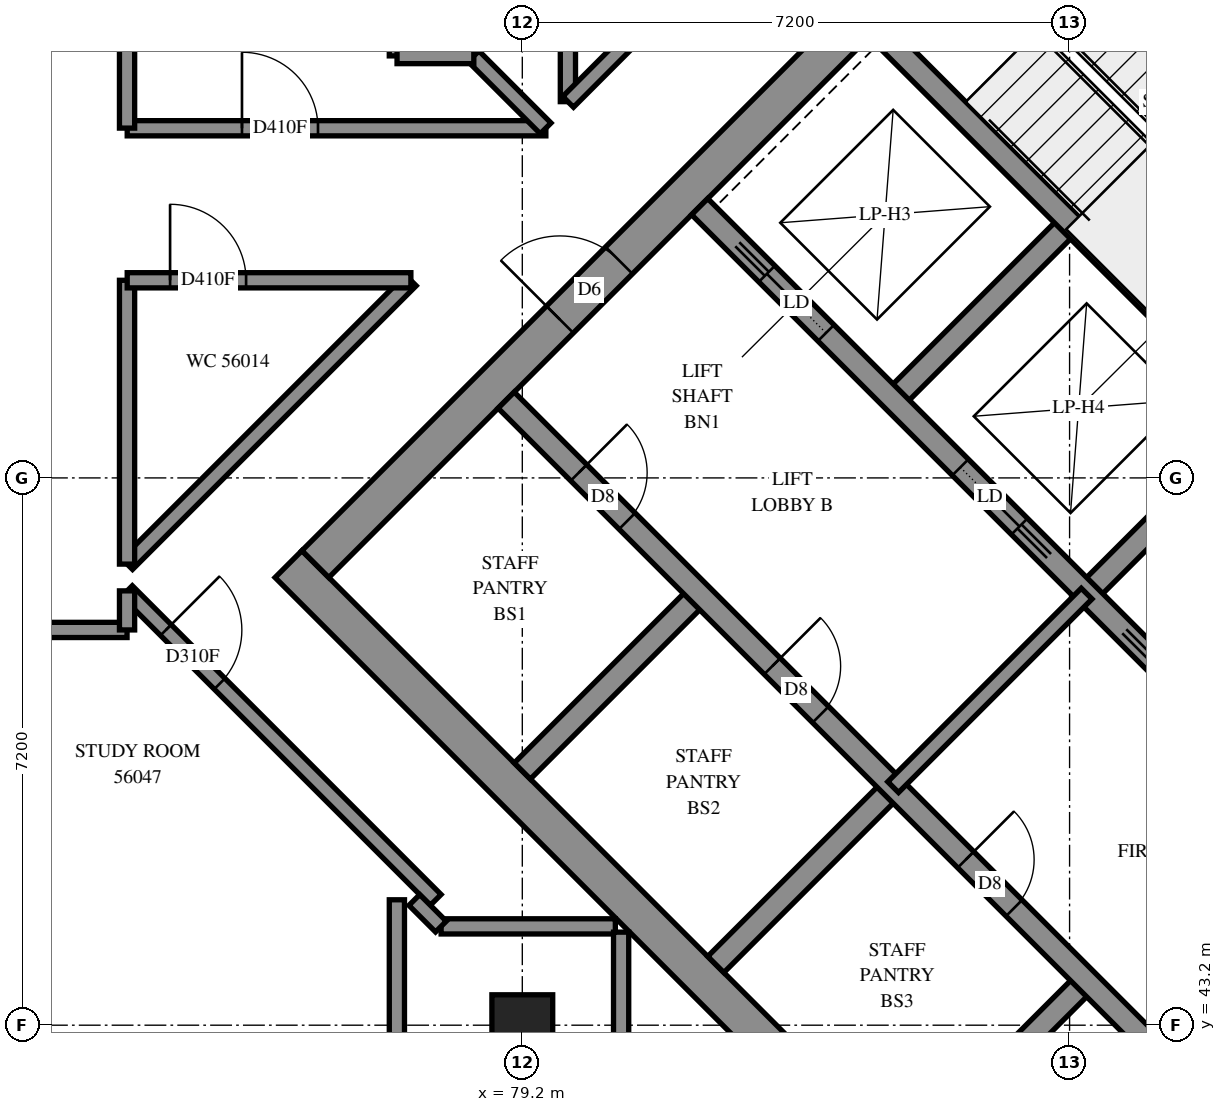
"""IFC4 building model, lengths in metres.
Left out: names, types, materials, properties, quantities, classifications, styles, units other than length and angle.
Written with IfcOpenShell. Run it as: python <this file> out.ifc"""

import sys

from ifc_helpers import new_model, si_unit, direction, frame, frame_2d, origin, origin_2d, place, context, subcontext, project, spatial, rectangle, extrude, element, fill, save


model = new_model("IFC4")
c1 = context("Model", 3, precision=1e-05, world=origin(), true_north=direction((0.0, 1.0)))
c2 = subcontext(c1, "Body", "Model", "MODEL_VIEW")
j1 = project(units=[si_unit("LENGTHUNIT", "METRE"), si_unit("PLANEANGLEUNIT", "RADIAN")], contexts=[c1])
p1 = place(None, origin())
s1 = spatial("IfcSite", under=j1, at=p1, CompositionType="ELEMENT")
p2 = place(p1, origin())
s2 = spatial("IfcBuilding", under=s1, at=p2, CompositionType="ELEMENT")
p3 = place(p2, frame((0.0, 0.0, 206.6)))
s3 = spatial("IfcBuildingStorey", under=s2, at=p3, CompositionType="ELEMENT", Elevation=206.6)
p4 = place(p3, frame((79.2, 43.2, 0.0), z_axis=(0.0, 0.0, 1.0), x_axis=(1.0, 0.0, 0.0)))
e1 = element("IfcColumn", 1, at=p4, inside=s3, PredefinedType="COLUMN", context=c2, shape_type="SweptSolid", body=[
    extrude(rectangle(XDim=0.8, YDim=0.8, at=origin_2d()), origin(), (0.0, 0.0, 1.0), 3.1),
])
p5 = place(p3, frame((76.124, 49.267, -0.3), z_axis=(0.0, 0.0, 1.0), x_axis=(0.7071067812, -0.7071067812, 0.0)))
e2 = element("IfcWall", 2, at=p5, inside=s3, PredefinedType="SHEAR", context=c2, shape_type="SweptSolid", body=[
    extrude(rectangle(XDim=15.4, YDim=0.5, at=frame_2d((7.7, 0.0))), origin(), (0.0, 0.0, 1.0), 2.7),
])
p6 = place(p3, frame((86.66, 59.802, -0.3), z_axis=(0.0, 0.0, 1.0), x_axis=(0.7071067812, -0.7071067812, 0.0)))
e3 = element("IfcWall", 3, at=p6, inside=s3, PredefinedType="SHEAR", context=c2, shape_type="SweptSolid", body=[
    extrude(rectangle(XDim=15.4, YDim=0.5, at=frame_2d((7.7, 0.0))), origin(), (0.0, 0.0, 1.0), 2.7),
])
p7 = place(p6, frame((10.5, 0.0, 0.3)))
e4 = element("IfcOpeningElement", 4, at=p7, cuts=e3, PredefinedType="OPENING", context=c2, shape_type="SweptSolid", body=[
    extrude(rectangle(XDim=0.8, YDim=2.1, at=frame_2d((0.4, 1.05))), frame((0.0, 0.26, 0.0), z_axis=(0.0, -1.0, 0.0), x_axis=(1.0, 0.0, 0.0)), (0.0, 0.0, 1.0), 0.52),
])
p8 = place(p3, frame((76.478, 49.267, -0.3), z_axis=(0.0, 0.0, 1.0), x_axis=(0.7071067812, 0.7071067812, 0.0)))
e5 = element("IfcWall", 5, at=p8, inside=s3, PredefinedType="SHEAR", context=c2, shape_type="SweptSolid", body=[
    extrude(rectangle(XDim=14.4, YDim=0.5, at=frame_2d((7.2, 0.0))), origin(), (0.0, 0.0, 1.0), 2.7),
])
p9 = place(p8, frame((4.55, 0.0, 0.3)))
e6 = element("IfcOpeningElement", 6, at=p9, cuts=e5, PredefinedType="OPENING", context=c2, shape_type="SweptSolid", body=[
    extrude(rectangle(XDim=1.1, YDim=2.1, at=frame_2d((0.55, 1.05))), frame((0.0, 0.26, 0.0), z_axis=(0.0, -1.0, 0.0), x_axis=(1.0, 0.0, 0.0)), (0.0, 0.0, 1.0), 0.52),
])
p10 = place(p8, frame((11.35, 0.0, 0.3)))
e7 = element("IfcOpeningElement", 7, at=p10, cuts=e5, PredefinedType="OPENING", context=c2, shape_type="SweptSolid", body=[
    extrude(rectangle(XDim=1.1, YDim=2.1, at=frame_2d((0.55, 1.05))), frame((0.0, 0.26, 0.0), z_axis=(0.0, -1.0, 0.0), x_axis=(1.0, 0.0, 0.0)), (0.0, 0.0, 1.0), 0.52),
])
p11 = place(p3, frame((87.013, 38.731, -0.3), z_axis=(0.0, 0.0, 1.0), x_axis=(0.7071067812, 0.7071067812, 0.0)))
e8 = element("IfcWall", 8, at=p11, inside=s3, PredefinedType="SHEAR", context=c2, shape_type="SweptSolid", body=[
    extrude(rectangle(XDim=14.4, YDim=0.5, at=frame_2d((7.2, 0.0))), origin(), (0.0, 0.0, 1.0), 2.7),
])
p12 = place(p11, frame((4.55, 0.0, 0.3)))
e9 = element("IfcOpeningElement", 9, at=p12, cuts=e8, PredefinedType="OPENING", context=c2, shape_type="SweptSolid", body=[
    extrude(rectangle(XDim=1.1, YDim=2.1, at=frame_2d((0.55, 1.05))), frame((0.0, 0.26, 0.0), z_axis=(0.0, -1.0, 0.0), x_axis=(1.0, 0.0, 0.0)), (0.0, 0.0, 1.0), 0.52),
])
p13 = place(p11, frame((11.35, 0.0, 0.3)))
e10 = element("IfcOpeningElement", 10, at=p13, cuts=e8, PredefinedType="OPENING", context=c2, shape_type="SweptSolid", body=[
    extrude(rectangle(XDim=1.1, YDim=2.1, at=frame_2d((0.55, 1.05))), frame((0.0, 0.26, 0.0), z_axis=(0.0, -1.0, 0.0), x_axis=(1.0, 0.0, 0.0)), (0.0, 0.0, 1.0), 0.52),
])
for number, where, z_axis, x_axis in (
    (11, (79.2, 46.544, 0.0), (0.0, 0.0, 1.0), (0.707, 0.707, 0.0)),
    (12, (84.079, 51.423, 0.0), (0.0, 0.0, 1.0), (0.707, 0.707, 0.0)),
):
    element("IfcWall", number, at=place(p3, frame(where, z_axis=z_axis, x_axis=x_axis)), inside=s3, PredefinedType="SOLIDWALL", context=c2, shape_type="SweptSolid", body=[
        extrude(rectangle(XDim=3.3, YDim=0.3, at=frame_2d((1.65, 0.0))), origin(), (0.0, 0.0, 1.0), 3.1),
    ])
p14 = place(p3, frame((81.746, 43.999, 0.0), z_axis=(0.0, 0.0, 1.0), x_axis=(0.7071067812, 0.7071067812, 0.0)))
e13 = element("IfcWall", 13, at=p14, inside=s3, PredefinedType="SOLIDWALL", context=c2, shape_type="SweptSolid", body=[
    extrude(rectangle(XDim=3.3, YDim=0.3, at=frame_2d((1.65, 0.0))), origin(), (0.0, 0.0, 1.0), 3.1),
])
p15 = place(p3, frame((86.625, 48.878, 0.0), z_axis=(0.0, 0.0, 1.0), x_axis=(0.7071067812, 0.7071067812, 0.0)))
e14 = element("IfcWall", 14, at=p15, inside=s3, PredefinedType="SOLIDWALL", context=c2, shape_type="SweptSolid", body=[
    extrude(rectangle(XDim=3.3, YDim=0.3, at=frame_2d((1.65, 0.0))), origin(), (0.0, 0.0, 1.0), 3.1),
])
p16 = place(p3, frame((84.291, 41.453, 0.0), z_axis=(0.0, 0.0, 1.0), x_axis=(0.7071067812, 0.7071067812, 0.0)))
e15 = element("IfcWall", 15, at=p16, inside=s3, PredefinedType="SOLIDWALL", context=c2, shape_type="SweptSolid", body=[
    extrude(rectangle(XDim=3.3, YDim=0.3, at=frame_2d((1.65, 0.0))), origin(), (0.0, 0.0, 1.0), 3.1),
])
p17 = place(p3, frame((78.988, 51.423, 0.0), z_axis=(0.0, 0.0, 1.0), x_axis=(0.7071067812, -0.7071067812, 0.0)))
e16 = element("IfcWall", 16, at=p17, inside=s3, PredefinedType="SOLIDWALL", context=c2, shape_type="SweptSolid", body=[
    extrude(rectangle(XDim=14.4, YDim=0.3, at=frame_2d((7.2, 0.0))), origin(), (0.0, 0.0, 1.0), 3.1),
])
p18 = place(p17, frame((1.35, 0.0, 0.0)))
e17 = element("IfcOpeningElement", 17, at=p18, cuts=e16, PredefinedType="OPENING", context=c2, shape_type="SweptSolid", body=[
    extrude(rectangle(XDim=0.9, YDim=2.1, at=frame_2d((0.45, 1.05))), frame((0.0, 0.16, 0.0), z_axis=(0.0, -1.0, 0.0), x_axis=(1.0, 0.0, 0.0)), (0.0, 0.0, 1.0), 0.32),
])
p19 = place(p17, frame((4.95, 0.0, 0.0)))
e18 = element("IfcOpeningElement", 18, at=p19, cuts=e16, PredefinedType="OPENING", context=c2, shape_type="SweptSolid", body=[
    extrude(rectangle(XDim=0.9, YDim=2.1, at=frame_2d((0.45, 1.05))), frame((0.0, 0.16, 0.0), z_axis=(0.0, -1.0, 0.0), x_axis=(1.0, 0.0, 0.0)), (0.0, 0.0, 1.0), 0.32),
])
p20 = place(p17, frame((8.55, 0.0, 0.0)))
e19 = element("IfcOpeningElement", 19, at=p20, cuts=e16, PredefinedType="OPENING", context=c2, shape_type="SweptSolid", body=[
    extrude(rectangle(XDim=0.9, YDim=2.1, at=frame_2d((0.45, 1.05))), frame((0.0, 0.16, 0.0), z_axis=(0.0, -1.0, 0.0), x_axis=(1.0, 0.0, 0.0)), (0.0, 0.0, 1.0), 0.32),
])
p21 = place(p17, frame((12.05, 0.0, 0.0)))
e20 = element("IfcOpeningElement", 20, at=p21, cuts=e16, PredefinedType="OPENING", context=c2, shape_type="SweptSolid", body=[
    extrude(rectangle(XDim=1.1, YDim=2.1, at=frame_2d((0.55, 1.05))), frame((0.0, 0.16, 0.0), z_axis=(0.0, -1.0, 0.0), x_axis=(1.0, 0.0, 0.0)), (0.0, 0.0, 1.0), 0.32),
])
p22 = place(p3, frame((81.534, 53.969, 0.0), z_axis=(0.0, 0.0, 1.0), x_axis=(0.707103309, -0.7071102534, 0.0)))
e21 = element("IfcWall", 21, at=p22, inside=s3, PredefinedType="SOLIDWALL", context=c2, shape_type="SweptSolid", body=[
    extrude(rectangle(XDim=14.4, YDim=0.3, at=frame_2d((7.2, 0.0))), origin(), (0.0, 0.0, 1.0), 3.1),
])
p23 = place(p22, frame((1.25, 0.0, 0.0)))
e22 = element("IfcOpeningElement", 22, at=p23, cuts=e21, PredefinedType="OPENING", context=c2, shape_type="SweptSolid", body=[
    extrude(rectangle(XDim=1.1, YDim=2.1, at=frame_2d((0.55, 1.05))), frame((0.0, 0.16, 0.0), z_axis=(0.0, -1.0, 0.0), x_axis=(1.0, 0.0, 0.0)), (0.0, 0.0, 1.0), 0.32),
])
p24 = place(p22, frame((4.85, 0.0, 0.0)))
e23 = element("IfcOpeningElement", 23, at=p24, cuts=e21, PredefinedType="OPENING", context=c2, shape_type="SweptSolid", body=[
    extrude(rectangle(XDim=1.1, YDim=2.1, at=frame_2d((0.55, 1.05))), frame((0.0, 0.16, 0.0), z_axis=(0.0, -1.0, 0.0), x_axis=(1.0, 0.0, 0.0)), (0.0, 0.0, 1.0), 0.32),
])
p25 = place(p22, frame((8.45, 0.0, 0.0)))
e24 = element("IfcOpeningElement", 24, at=p25, cuts=e21, PredefinedType="OPENING", context=c2, shape_type="SweptSolid", body=[
    extrude(rectangle(XDim=1.1, YDim=2.1, at=frame_2d((0.55, 1.05))), frame((0.0, 0.16, 0.0), z_axis=(0.0, -1.0, 0.0), x_axis=(1.0, 0.0, 0.0)), (0.0, 0.0, 1.0), 0.32),
])
p26 = place(p22, frame((12.05, 0.0, 0.0)))
e25 = element("IfcOpeningElement", 25, at=p26, cuts=e21, PredefinedType="OPENING", context=c2, shape_type="SweptSolid", body=[
    extrude(rectangle(XDim=1.1, YDim=2.1, at=frame_2d((0.55, 1.05))), frame((0.0, 0.16, 0.0), z_axis=(0.0, -1.0, 0.0), x_axis=(1.0, 0.0, 0.0)), (0.0, 0.0, 1.0), 0.32),
])
p27 = place(p3, frame((83.867, 56.302, 0.0), z_axis=(0.0, 0.0, 1.0), x_axis=(0.7071137256, -0.7070998367, 0.0)))
e26 = element("IfcWall", 26, at=p27, inside=s3, PredefinedType="SOLIDWALL", context=c2, shape_type="SweptSolid", body=[
    extrude(rectangle(XDim=7.2, YDim=0.3, at=frame_2d((3.6, 0.0))), origin(), (0.0, 0.0, 1.0), 3.1),
])
p28 = place(p3, frame((84.079, 46.332, 0.0), z_axis=(0.0, 0.0, 1.0), x_axis=(0.7071067812, 0.7071067812, 0.0)))
e27 = element("IfcWall", 27, at=p28, inside=s3, PredefinedType="PARTITIONING", context=c2, shape_type="SweptSolid", body=[
    extrude(rectangle(XDim=3.6, YDim=0.2, at=frame_2d((1.8, 0.0))), origin(), (0.0, 0.0, 1.0), 3.1),
])
p29 = place(p3, frame((55.6, 48.4, 0.0), z_axis=(0.0, 0.0, 1.0), x_axis=(1.0, 0.0, 0.0)))
e28 = element("IfcWall", 28, at=p29, inside=s3, PredefinedType="PARTITIONING", context=c2, shape_type="SweptSolid", body=[
    extrude(rectangle(XDim=18.4, YDim=0.2, at=frame_2d((9.2, 0.0))), origin(), (0.0, 0.0, 1.0), 3.1),
])
p30 = place(p29, frame((5.862, 0.0, 0.0)))
e29 = element("IfcOpeningElement", 29, at=p30, cuts=e28, PredefinedType="OPENING", context=c2, shape_type="SweptSolid", body=[
    extrude(rectangle(XDim=1.0, YDim=2.1, at=frame_2d((0.5, 1.05))), frame((0.0, 0.11, 0.0), z_axis=(0.0, -1.0, 0.0), x_axis=(1.0, 0.0, 0.0)), (0.0, 0.0, 1.0), 0.22),
])
p31 = place(p29, frame((13.099, 0.0, 0.0)))
e30 = element("IfcOpeningElement", 30, at=p31, cuts=e28, PredefinedType="OPENING", context=c2, shape_type="SweptSolid", body=[
    extrude(rectangle(XDim=0.9, YDim=2.1, at=frame_2d((0.45, 1.05))), frame((0.0, 0.11, 0.0), z_axis=(0.0, -1.0, 0.0), x_axis=(1.0, 0.0, 0.0)), (0.0, 0.0, 1.0), 0.22),
])
p32 = place(p3, frame((73.999, 48.911, 0.0), z_axis=(0.0, 0.0, 1.0), x_axis=(0.7071067812, -0.7071067812, 0.0)))
e31 = element("IfcWall", 31, at=p32, inside=s3, PredefinedType="PARTITIONING", context=c2, shape_type="SweptSolid", body=[
    extrude(rectangle(XDim=5.745, YDim=0.2, at=frame_2d((2.872, 0.0))), origin(), (0.0, 0.0, 1.0), 3.1),
])
p33 = place(p32, frame((0.724, 0.0, 0.0)))
e32 = element("IfcOpeningElement", 32, at=p33, cuts=e31, PredefinedType="OPENING", context=c2, shape_type="SweptSolid", body=[
    extrude(rectangle(XDim=1.0, YDim=2.1, at=frame_2d((0.5, 1.05))), frame((0.0, 0.11, 0.0), z_axis=(0.0, -1.0, 0.0), x_axis=(1.0, 0.0, 0.0)), (0.0, 0.0, 1.0), 0.22),
])
p34 = place(p3, frame((74.002, 55.0, 0.0), z_axis=(0.0, 0.0, 1.0), x_axis=(1.0, 0.0, 0.0)))
e33 = element("IfcWall", 33, at=p34, inside=s3, PredefinedType="PARTITIONING", context=c2, shape_type="SweptSolid", body=[
    extrude(rectangle(XDim=5.508, YDim=0.2, at=frame_2d((2.754, 0.0))), origin(), (0.0, 0.0, 1.0), 3.1),
])
p35 = place(p34, frame((1.51, 0.0, 0.0)))
e34 = element("IfcOpeningElement", 34, at=p35, cuts=e33, PredefinedType="OPENING", context=c2, shape_type="SweptSolid", body=[
    extrude(rectangle(XDim=1.0, YDim=2.1, at=frame_2d((0.5, 1.05))), frame((0.0, 0.11, 0.0), z_axis=(0.0, -1.0, 0.0), x_axis=(1.0, 0.0, 0.0)), (0.0, 0.0, 1.0), 0.22),
])
p36 = place(p3, frame((74.0, 55.002, 0.0), z_axis=(0.0, 0.0, 1.0), x_axis=(0.0, 1.0, 0.0)))
e35 = element("IfcWall", 35, at=p36, inside=s3, PredefinedType="PARTITIONING", context=c2, shape_type="SweptSolid", body=[
    extrude(rectangle(XDim=5.508, YDim=0.2, at=frame_2d((2.754, 0.0))), origin(), (0.0, 0.0, 1.0), 3.1),
])
p37 = place(p3, frame((74.001, 49.267, 0.0), z_axis=(0.0, 0.0, 1.0), x_axis=(0.7071067812, 0.7071067812, 0.0)))
e36 = element("IfcWall", 36, at=p37, inside=s3, PredefinedType="PARTITIONING", context=c2, shape_type="SweptSolid", body=[
    extrude(rectangle(XDim=5.278, YDim=0.2, at=frame_2d((2.639, 0.0))), origin(), (0.0, 0.0, 1.0), 3.1),
])
p38 = place(p3, frame((79.8, 55.35, 0.0), z_axis=(0.0, 0.0, 1.0), x_axis=(0.0, 1.0, 0.0)))
e37 = element("IfcWall", 37, at=p38, inside=s3, PredefinedType="PARTITIONING", context=c2, shape_type="SweptSolid", body=[
    extrude(rectangle(XDim=3.9, YDim=0.2, at=frame_2d((1.95, 0.0))), origin(), (0.0, 0.0, 1.0), 3.1),
])
p39 = place(p3, frame((74.0, 49.266, 0.0), z_axis=(0.0, 0.0, 1.0), x_axis=(0.0, 1.0, 0.0)))
e38 = element("IfcWall", 38, at=p39, inside=s3, PredefinedType="PARTITIONING", context=c2, shape_type="SweptSolid", body=[
    extrude(rectangle(XDim=3.734, YDim=0.2, at=frame_2d((1.867, 0.0))), origin(), (0.0, 0.0, 1.0), 3.1),
])
p40 = place(p3, frame((74.002, 53.0, 0.0), z_axis=(0.0, 0.0, 1.0), x_axis=(1.0, 0.0, 0.0)))
e39 = element("IfcWall", 39, at=p40, inside=s3, PredefinedType="PARTITIONING", context=c2, shape_type="SweptSolid", body=[
    extrude(rectangle(XDim=3.732, YDim=0.2, at=frame_2d((1.866, 0.0))), origin(), (0.0, 0.0, 1.0), 3.1),
])
p41 = place(p40, frame((0.564, 0.0, 0.0)))
e40 = element("IfcOpeningElement", 40, at=p41, cuts=e39, PredefinedType="OPENING", context=c2, shape_type="SweptSolid", body=[
    extrude(rectangle(XDim=1.0, YDim=2.1, at=frame_2d((0.5, 1.05))), frame((0.0, 0.11, 0.0), z_axis=(0.0, -1.0, 0.0), x_axis=(1.0, 0.0, 0.0)), (0.0, 0.0, 1.0), 0.22),
])
p42 = place(p3, frame((77.55, 41.603, 0.0), z_axis=(0.0, 0.0, 1.0), x_axis=(0.0, 1.0, 0.0)))
e41 = element("IfcWall", 41, at=p42, inside=s3, PredefinedType="PARTITIONING", context=c2, shape_type="SweptSolid", body=[
    extrude(rectangle(XDim=3.247, YDim=0.2, at=frame_2d((1.623, 0.0))), origin(), (0.0, 0.0, 1.0), 3.1),
])
for number, where, z_axis, x_axis in (
    (42, (78.132, 44.5, 0.0), (0.0, 0.0, 1.0), (1.0, 0.0, 0.0)),
    (43, (80.5, 42.132, 0.0), (0.0, 0.0, 1.0), (0.0, 1.0, 0.0)),
):
    element("IfcWall", number, at=place(p3, frame(where, z_axis=z_axis, x_axis=x_axis)), inside=s3, PredefinedType="PARTITIONING", context=c2, shape_type="SweptSolid", body=[
        extrude(rectangle(XDim=2.292, YDim=0.2, at=frame_2d((1.146, 0.0))), origin(), (0.0, 0.0, 1.0), 3.1),
    ])
p43 = place(p3, frame((79.803, 55.347, 0.0), z_axis=(0.0, 0.0, 1.0), x_axis=(0.706460727, 0.7077522457, 0.0)))
e44 = element("IfcWall", 44, at=p43, inside=s3, PredefinedType="PARTITIONING", context=c2, shape_type="SweptSolid", body=[
    extrude(rectangle(XDim=1.549, YDim=0.2, at=frame_2d((0.774, 0.0))), origin(), (0.0, 0.0, 1.0), 3.1),
])
p44 = place(p3, frame((78.559, 55.947, 0.0), z_axis=(0.0, 0.0, 1.0), x_axis=(0.7071067812, -0.7071067812, 0.0)))
e45 = element("IfcWall", 45, at=p44, inside=s3, PredefinedType="PARTITIONING", context=c2, shape_type="SweptSolid", body=[
    extrude(rectangle(XDim=1.341, YDim=0.2, at=frame_2d((0.67, 0.0))), origin(), (0.0, 0.0, 1.0), 3.1),
])
for number, where, z_axis, x_axis in (
    (46, (77.55, 55.952, 0.0), (0.0, 0.0, 1.0), (0.0, 1.0, 0.0)),
    (47, (77.552, 55.95, 0.0), (0.0, 0.0, 1.0), (1.0, 0.0, 0.0)),
):
    element("IfcWall", number, at=place(p3, frame(where, z_axis=z_axis, x_axis=x_axis)), inside=s3, PredefinedType="PARTITIONING", context=c2, shape_type="SweptSolid", body=[
        extrude(rectangle(XDim=1.01, YDim=0.2, at=frame_2d((0.505, 0.0))), origin(), (0.0, 0.0, 1.0), 3.1),
    ])
p45 = place(p3, frame((74.0, 48.4, 0.0), z_axis=(0.0, 0.0, 1.0), x_axis=(0.0, 1.0, 0.0)))
e48 = element("IfcWall", 48, at=p45, inside=s3, PredefinedType="PARTITIONING", context=c2, shape_type="SweptSolid", body=[
    extrude(rectangle(XDim=0.514, YDim=0.2, at=frame_2d((0.257, 0.0))), origin(), (0.0, 0.0, 1.0), 3.1),
])
p46 = place(p3, frame((77.779, 44.847, 0.0), z_axis=(0.0, 0.0, 1.0), x_axis=(0.7071067812, -0.7071067812, 0.0)))
e49 = element("IfcWall", 49, at=p46, inside=s3, PredefinedType="PARTITIONING", context=c2, shape_type="SweptSolid", body=[
    extrude(rectangle(XDim=0.495, YDim=0.2, at=frame_2d((0.247, 0.0))), origin(), (0.0, 0.0, 1.0), 3.1),
])
p47 = place(p9, origin())
e50 = element("IfcDoor", 50, at=p47, inside=s3, OperationType="DOUBLE_DOOR_SINGLE_SWING", PredefinedType="DOOR", context=c2, shape_type="SweptSolid", body=[
    extrude(rectangle(XDim=1.1, YDim=2.1, at=frame_2d((0.55, 1.05))), frame((0.0, 0.025, 0.0), z_axis=(0.0, -1.0, 0.0), x_axis=(1.0, 0.0, 0.0)), (0.0, 0.0, 1.0), 0.05),
])
fill(e6, e50)
p48 = place(p18, origin())
e51 = element("IfcDoor", 51, at=p48, inside=s3, OperationType="SINGLE_SWING_LEFT", PredefinedType="DOOR", context=c2, shape_type="SweptSolid", body=[
    extrude(rectangle(XDim=0.9, YDim=2.1, at=frame_2d((0.45, 1.05))), frame((0.0, 0.025, 0.0), z_axis=(0.0, -1.0, 0.0), x_axis=(1.0, 0.0, 0.0)), (0.0, 0.0, 1.0), 0.05),
])
fill(e17, e51)
p49 = place(p19, origin())
e52 = element("IfcDoor", 52, at=p49, inside=s3, OperationType="SINGLE_SWING_LEFT", PredefinedType="DOOR", context=c2, shape_type="SweptSolid", body=[
    extrude(rectangle(XDim=0.9, YDim=2.1, at=frame_2d((0.45, 1.05))), frame((0.0, 0.025, 0.0), z_axis=(0.0, -1.0, 0.0), x_axis=(1.0, 0.0, 0.0)), (0.0, 0.0, 1.0), 0.05),
])
fill(e18, e52)
p50 = place(p20, origin())
e53 = element("IfcDoor", 53, at=p50, inside=s3, OperationType="SINGLE_SWING_LEFT", PredefinedType="DOOR", context=c2, shape_type="SweptSolid", body=[
    extrude(rectangle(XDim=0.9, YDim=2.1, at=frame_2d((0.45, 1.05))), frame((0.0, 0.025, 0.0), z_axis=(0.0, -1.0, 0.0), x_axis=(1.0, 0.0, 0.0)), (0.0, 0.0, 1.0), 0.05),
])
fill(e19, e53)
p51 = place(p23, origin())
e54 = element("IfcDoor", 54, at=p51, inside=s3, OperationType="SLIDING_TO_LEFT", PredefinedType="DOOR", context=c2, shape_type="SweptSolid", body=[
    extrude(rectangle(XDim=1.1, YDim=2.1, at=frame_2d((0.55, 1.05))), frame((0.0, 0.025, 0.0), z_axis=(0.0, -1.0, 0.0), x_axis=(1.0, 0.0, 0.0)), (0.0, 0.0, 1.0), 0.05),
])
fill(e22, e54)
p52 = place(p24, origin())
e55 = element("IfcDoor", 55, at=p52, inside=s3, OperationType="SLIDING_TO_RIGHT", PredefinedType="DOOR", context=c2, shape_type="SweptSolid", body=[
    extrude(rectangle(XDim=1.1, YDim=2.1, at=frame_2d((0.55, 1.05))), frame((0.0, 0.025, 0.0), z_axis=(0.0, -1.0, 0.0), x_axis=(1.0, 0.0, 0.0)), (0.0, 0.0, 1.0), 0.05),
])
fill(e23, e55)
p53 = place(p41, origin())
e56 = element("IfcDoor", 56, at=p53, inside=s3, OperationType="SINGLE_SWING_RIGHT", PredefinedType="DOOR", context=c2, shape_type="SweptSolid", body=[
    extrude(rectangle(XDim=1.0, YDim=2.1, at=frame_2d((0.5, 1.05))), frame((0.0, 0.025, 0.0), z_axis=(0.0, -1.0, 0.0), x_axis=(1.0, 0.0, 0.0)), (0.0, 0.0, 1.0), 0.05),
])
fill(e40, e56)
p54 = place(p33, origin())
e57 = element("IfcDoor", 57, at=p54, inside=s3, OperationType="SINGLE_SWING_LEFT", PredefinedType="DOOR", context=c2, shape_type="SweptSolid", body=[
    extrude(rectangle(XDim=1.0, YDim=2.1, at=frame_2d((0.5, 1.05))), frame((0.0, 0.025, 0.0), z_axis=(0.0, -1.0, 0.0), x_axis=(1.0, 0.0, 0.0)), (0.0, 0.0, 1.0), 0.05),
])
fill(e32, e57)
p55 = place(p35, origin())
e58 = element("IfcDoor", 58, at=p55, inside=s3, OperationType="SINGLE_SWING_LEFT", PredefinedType="DOOR", context=c2, shape_type="SweptSolid", body=[
    extrude(rectangle(XDim=1.0, YDim=2.1, at=frame_2d((0.5, 1.05))), frame((0.0, 0.025, 0.0), z_axis=(0.0, -1.0, 0.0), x_axis=(1.0, 0.0, 0.0)), (0.0, 0.0, 1.0), 0.05),
])
fill(e34, e58)
save(model, sys.argv[1])
